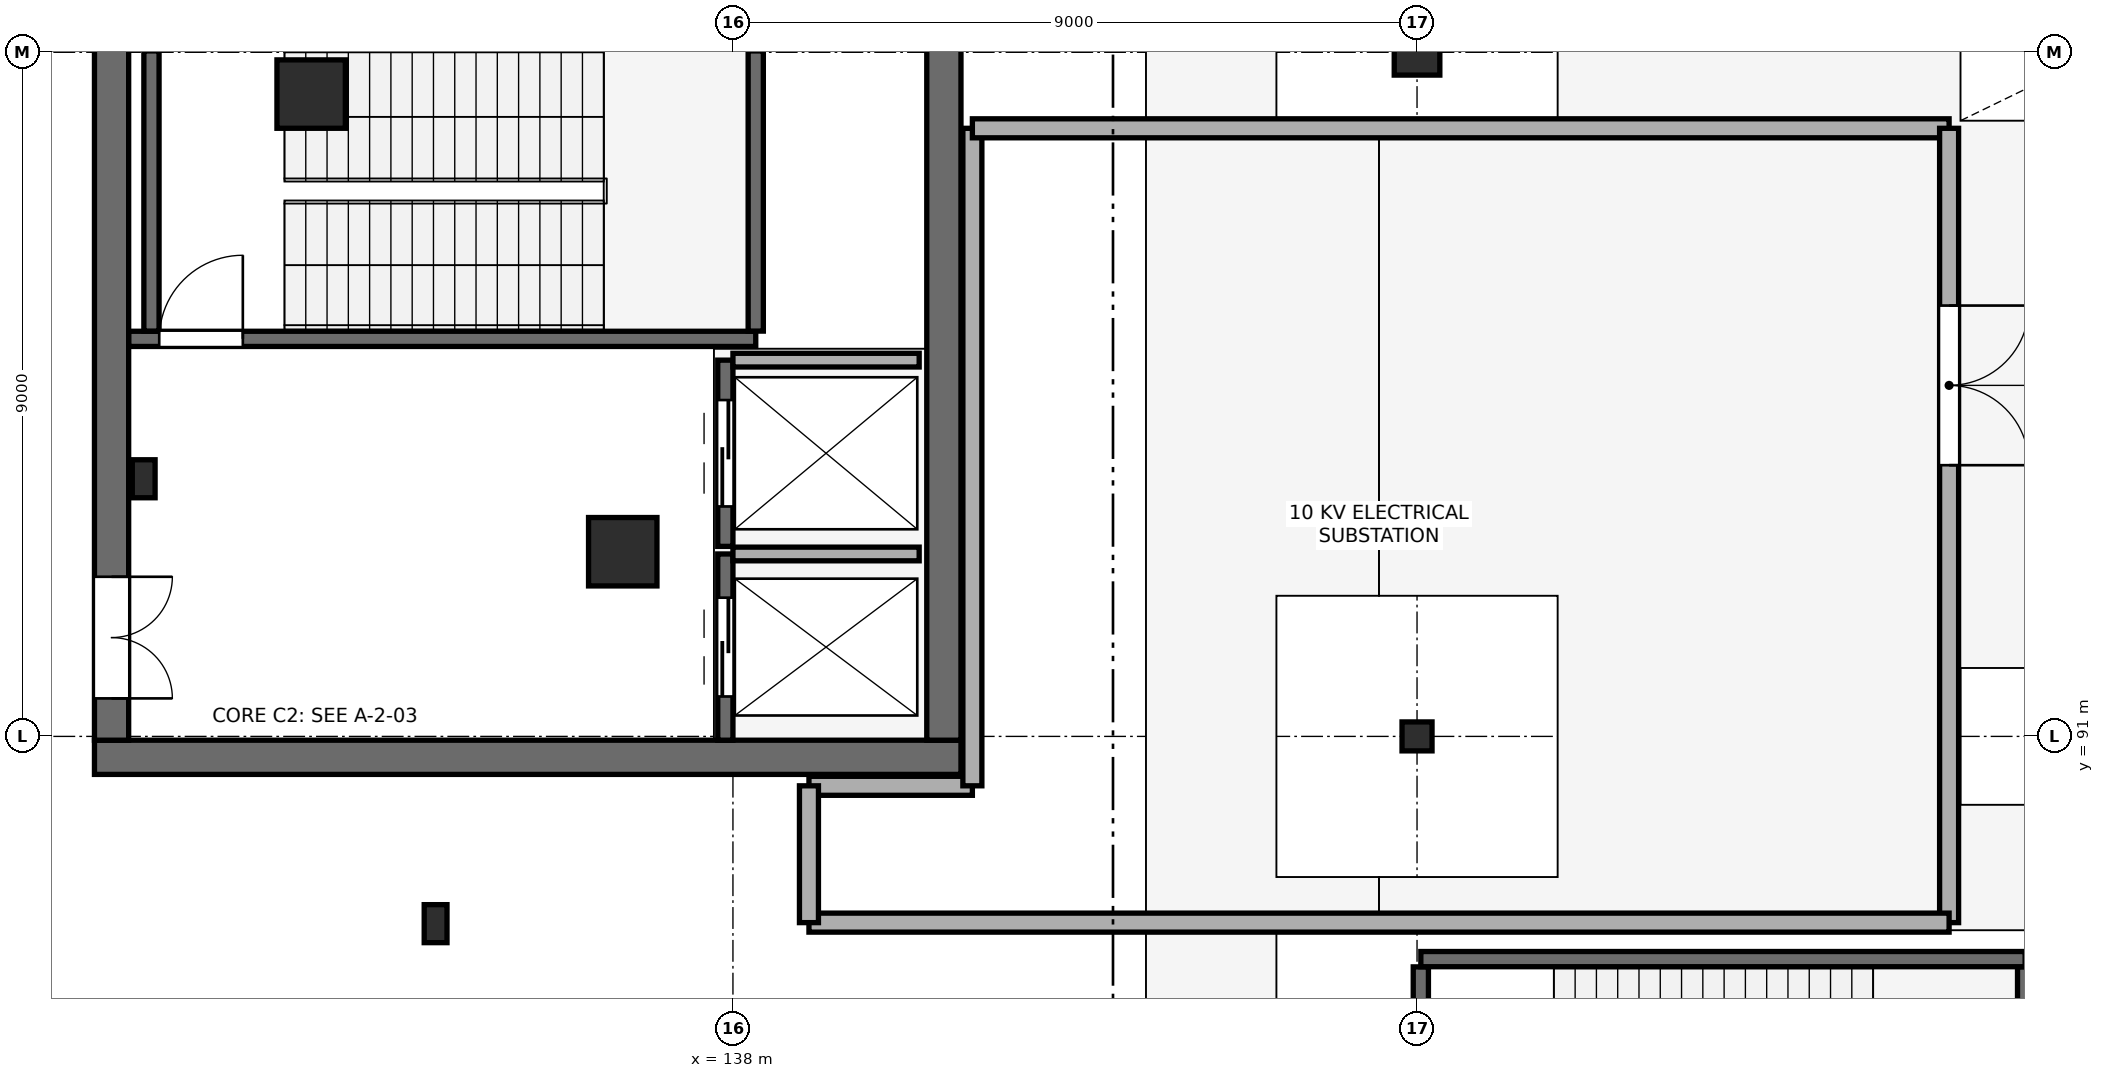
"""IFC4 building model, lengths in metres.
Left out: names, types, materials, properties, quantities, classifications, styles, units other than length and angle.
Written with IfcOpenShell. Run it as: python <this file> out.ifc"""

import sys

from ifc_helpers import new_model, si_unit, direction, frame, frame_2d, origin, origin_2d, place, context, subcontext, project, spatial, rectangle, i_section, extrude, element, fill, save


model = new_model("IFC4")
c1 = context("Model", 3, precision=1e-05, world=origin(), true_north=direction((0.0, 1.0)))
c2 = subcontext(c1, "Body", "Model", "MODEL_VIEW")
j1 = project(units=[si_unit("LENGTHUNIT", "METRE"), si_unit("PLANEANGLEUNIT", "RADIAN")], contexts=[c1])
p1 = place(None, origin())
s1 = spatial("IfcSite", under=j1, at=p1, CompositionType="ELEMENT")
p2 = place(p1, origin())
s2 = spatial("IfcBuilding", under=s1, at=p2, CompositionType="ELEMENT")
p3 = place(p2, frame((0.0, 0.0, -5.4)))
s3 = spatial("IfcBuildingStorey", under=s2, at=p3, CompositionType="ELEMENT", Elevation=-5.4)
for number, where, z_axis, x_axis in (
    (1, (136.55, 93.43, 0.0), (0.0, 0.0, 1.0), (1.0, 0.0, 0.0)),
    (2, (132.451, 99.45, 0.0), (0.0, 0.0, 1.0), (1.0, 0.0, 0.0)),
):
    element("IfcColumn", number, at=place(p3, frame(where, z_axis=z_axis, x_axis=x_axis)), inside=s3, PredefinedType="COLUMN", context=c2, shape_type="SweptSolid", body=[
        extrude(rectangle(XDim=0.9, YDim=0.9, at=origin_2d()), origin(), (0.0, 0.0, 1.0), 5.4),
    ])
p4 = place(p3, frame((134.088, 88.537, 0.0), z_axis=(0.0, 0.0, 1.0), x_axis=(1.0, 0.0, 0.0)))
e3 = element("IfcColumn", 3, at=p4, inside=s3, PredefinedType="COLUMN", context=c2, shape_type="SweptSolid", body=[
    extrude(i_section(OverallWidth=0.3, OverallDepth=0.5, WebThickness=0.014, FlangeThickness=0.028, FilletRadius=0.027, at=origin_2d()), origin(), (0.0, 0.0, 1.0), 5.4),
])
p5 = place(p3, frame((147.0, 91.0, 0.0), z_axis=(0.0, 0.0, 1.0), x_axis=(1.0, 0.0, 0.0)))
e4 = element("IfcColumn", 4, at=p5, inside=s3, PredefinedType="COLUMN", context=c2, shape_type="SweptSolid", body=[
    extrude(i_section(OverallWidth=0.395, OverallDepth=0.381, WebThickness=0.018, FlangeThickness=0.03, FilletRadius=0.015, at=origin_2d()), origin(), (0.0, 0.0, 1.0), 5.4),
])
p6 = place(p3, frame((147.0, 100.0, 0.0), z_axis=(0.0, 0.0, 1.0), x_axis=(1.0, 0.0, 0.0)))
e5 = element("IfcColumn", 5, at=p6, inside=s3, PredefinedType="COLUMN", context=c2, shape_type="SweptSolid", body=[
    extrude(rectangle(XDim=0.6, YDim=0.6, at=origin_2d()), origin(), (0.0, 0.0, 1.0), 5.4),
])
p7 = place(p3, frame((129.6, 90.725, 0.0), z_axis=(0.0, 0.0, 1.0), x_axis=(1.0, 0.0, 0.0)))
e6 = element("IfcWall", 6, at=p7, inside=s3, PredefinedType="SHEAR", context=c2, shape_type="SweptSolid", body=[
    extrude(rectangle(XDim=11.4, YDim=0.45, at=frame_2d((5.7, 0.0))), origin(), (0.0, 0.0, 1.0), 5.4),
])
p8 = place(p3, frame((129.825, 90.95, 0.0), z_axis=(0.0, 0.0, 1.0), x_axis=(0.0, 1.0, 0.0)))
e7 = element("IfcWall", 7, at=p8, inside=s3, PredefinedType="SHEAR", context=c2, shape_type="SweptSolid", body=[
    extrude(rectangle(XDim=9.1, YDim=0.45, at=frame_2d((4.55, 0.0))), origin(), (0.0, 0.0, 1.0), 5.4),
])
p9 = place(p8, frame((0.55, 0.0, 0.0)))
e8 = element("IfcOpeningElement", 8, at=p9, cuts=e7, PredefinedType="OPENING", context=c2, shape_type="SweptSolid", body=[
    extrude(rectangle(XDim=1.6, YDim=2.2, at=frame_2d((0.8, 1.1))), frame((0.0, 0.235, 0.0), z_axis=(0.0, -1.0, 0.0), x_axis=(1.0, 0.0, 0.0)), (0.0, 0.0, 1.0), 0.47),
])
p10 = place(p3, frame((140.775, 90.95, 0.0), z_axis=(0.0, 0.0, 1.0), x_axis=(0.0, 1.0, 0.0)))
e9 = element("IfcWall", 9, at=p10, inside=s3, PredefinedType="SHEAR", context=c2, shape_type="SweptSolid", body=[
    extrude(rectangle(XDim=9.1, YDim=0.45, at=frame_2d((4.55, 0.0))), origin(), (0.0, 0.0, 1.0), 5.4),
])
p11 = place(p3, frame((130.248, 94.389, 0.0), z_axis=(0.0, 0.0, 1.0), x_axis=(1.0, 0.0, 0.0)))
e10 = element("IfcColumn", 10, at=p11, inside=s3, PredefinedType="COLUMN", context=c2, shape_type="SweptSolid", body=[
    extrude(i_section(OverallWidth=0.3, OverallDepth=0.5, WebThickness=0.014, FlangeThickness=0.028, FilletRadius=0.027, at=origin_2d()), origin(), (0.0, 0.0, 1.0), 5.4),
])
p12 = place(p3, frame((137.9, 90.95, 0.0), z_axis=(0.0, 0.0, 1.0), x_axis=(0.0, 1.0, 0.0)))
e11 = element("IfcWall", 11, at=p12, inside=s3, PredefinedType="SHEAR", context=c2, shape_type="SweptSolid", body=[
    extrude(rectangle(XDim=2.45, YDim=0.2, at=frame_2d((1.225, 0.0))), origin(), (0.0, 0.0, 1.0), 5.04),
])
p13 = place(p12, frame((0.575, 0.0, 0.0)))
e12 = element("IfcOpeningElement", 12, at=p13, cuts=e11, PredefinedType="OPENING", context=c2, shape_type="SweptSolid", body=[
    extrude(rectangle(XDim=1.3, YDim=2.2, at=frame_2d((0.65, 1.1))), frame((0.0, 0.11, 0.0), z_axis=(0.0, -1.0, 0.0), x_axis=(1.0, 0.0, 0.0)), (0.0, 0.0, 1.0), 0.22),
])
p14 = place(p3, frame((138.0, 93.4, 0.0), z_axis=(0.0, 0.0, 1.0), x_axis=(1.0, 0.0, 0.0)))
e13 = element("IfcWall", 13, at=p14, inside=s3, PredefinedType="PARTITIONING", context=c2, shape_type="SweptSolid", body=[
    extrude(rectangle(XDim=2.45, YDim=0.18, at=frame_2d((1.225, 0.0))), origin(), (0.0, 0.0, 1.0), 5.4),
])
p15 = place(p3, frame((137.9, 93.5, 0.0), z_axis=(0.0, 0.0, 1.0), x_axis=(0.0, 1.0, 0.0)))
e14 = element("IfcWall", 14, at=p15, inside=s3, PredefinedType="SHEAR", context=c2, shape_type="SweptSolid", body=[
    extrude(rectangle(XDim=2.45, YDim=0.2, at=frame_2d((1.225, 0.0))), origin(), (0.0, 0.0, 1.0), 5.04),
])
p16 = place(p15, frame((0.525, 0.0, 0.0)))
e15 = element("IfcOpeningElement", 15, at=p16, cuts=e14, PredefinedType="OPENING", context=c2, shape_type="SweptSolid", body=[
    extrude(rectangle(XDim=1.4, YDim=2.2, at=frame_2d((0.7, 1.1))), frame((0.0, 0.11, 0.0), z_axis=(0.0, -1.0, 0.0), x_axis=(1.0, 0.0, 0.0)), (0.0, 0.0, 1.0), 0.22),
])
p17 = place(p3, frame((138.0, 95.95, 0.0), z_axis=(0.0, 0.0, 1.0), x_axis=(1.0, 0.0, 0.0)))
e16 = element("IfcWall", 16, at=p17, inside=s3, PredefinedType="PARTITIONING", context=c2, shape_type="SweptSolid", body=[
    extrude(rectangle(XDim=2.45, YDim=0.18, at=frame_2d((1.225, 0.0))), origin(), (0.0, 0.0, 1.0), 5.4),
])
p18 = place(p3, frame((130.052, 96.23, 0.0), z_axis=(0.0, 0.0, 1.0), x_axis=(1.0, 0.0, 0.0)))
e17 = element("IfcWall", 17, at=p18, inside=s3, PredefinedType="SHEAR", context=c2, shape_type="SweptSolid", body=[
    extrude(rectangle(XDim=8.248, YDim=0.2, at=frame_2d((4.124, 0.0))), origin(), (0.0, 0.0, 1.0), 5.4),
])
p19 = place(p18, frame((0.4, 0.0, 0.0)))
e18 = element("IfcOpeningElement", 18, at=p19, cuts=e17, PredefinedType="OPENING", context=c2, shape_type="SweptSolid", body=[
    extrude(rectangle(XDim=1.1, YDim=2.15, at=frame_2d((0.55, 1.075))), frame((0.0, 0.11, 0.0), z_axis=(0.0, -1.0, 0.0), x_axis=(1.0, 0.0, 0.0)), (0.0, 0.0, 1.0), 0.22),
])
for number, where, z_axis, x_axis in (
    (19, (130.35, 96.332, 0.0), (0.0, 0.0, 1.0), (0.0, 1.0, 0.0)),
    (20, (138.3, 96.332, 0.0), (0.0, 0.0, 1.0), (0.0, 1.0, 0.0)),
):
    element("IfcWall", number, at=place(p3, frame(where, z_axis=z_axis, x_axis=x_axis)), inside=s3, PredefinedType="SHEAR", context=c2, shape_type="SweptSolid", body=[
        extrude(rectangle(XDim=3.686, YDim=0.2, at=frame_2d((1.843, 0.0))), origin(), (0.0, 0.0, 1.0), 5.4),
    ])
p20 = place(p3, frame((147.05, 84.382, 0.0), z_axis=(0.0, 0.0, 1.0), x_axis=(0.0, 1.0, 0.0)))
e21 = element("IfcWall", 21, at=p20, inside=s3, PredefinedType="SHEAR", context=c2, shape_type="SweptSolid", body=[
    extrude(rectangle(XDim=3.586, YDim=0.2, at=frame_2d((1.793, 0.0))), origin(), (0.0, 0.0, 1.0), 5.4),
])
p21 = place(p20, frame((1.243, 0.0, 0.0)))
e22 = element("IfcOpeningElement", 22, at=p21, cuts=e21, PredefinedType="OPENING", context=c2, shape_type="SweptSolid", body=[
    extrude(rectangle(XDim=1.1, YDim=2.15, at=frame_2d((0.55, 1.075))), frame((0.0, 0.11, 0.0), z_axis=(0.0, -1.0, 0.0), x_axis=(1.0, 0.0, 0.0)), (0.0, 0.0, 1.0), 0.22),
])
p22 = place(p3, frame((155.0, 84.382, 0.0), z_axis=(0.0, 0.0, 1.0), x_axis=(0.0, 1.0, 0.0)))
e23 = element("IfcWall", 23, at=p22, inside=s3, PredefinedType="SHEAR", context=c2, shape_type="SweptSolid", body=[
    extrude(rectangle(XDim=3.586, YDim=0.2, at=frame_2d((1.793, 0.0))), origin(), (0.0, 0.0, 1.0), 5.4),
])
p23 = place(p3, frame((147.05, 88.07, 0.0), z_axis=(0.0, 0.0, 1.0), x_axis=(1.0, 0.0, 0.0)))
e24 = element("IfcWall", 24, at=p23, inside=s3, PredefinedType="SHEAR", context=c2, shape_type="SweptSolid", body=[
    extrude(rectangle(XDim=7.95, YDim=0.2, at=frame_2d((3.975, 0.0))), origin(), (0.0, 0.0, 1.0), 5.4),
])
p24 = place(p3, frame((139.0, 90.35, 0.0), z_axis=(0.0, 0.0, 1.0), x_axis=(1.0, 0.0, 0.0)))
e25 = element("IfcWall", 25, at=p24, inside=s3, PredefinedType="STANDARD", context=c2, shape_type="SweptSolid", body=[
    extrude(rectangle(XDim=2.15, YDim=0.25, at=frame_2d((1.075, 0.0))), origin(), (0.0, 0.0, 1.0), 5.04),
])
p25 = place(p3, frame((141.15, 90.35, 0.0), z_axis=(0.0, 0.0, 1.0), x_axis=(0.0, 1.0, 0.0)))
e26 = element("IfcWall", 26, at=p25, inside=s3, PredefinedType="STANDARD", context=c2, shape_type="SweptSolid", body=[
    extrude(rectangle(XDim=8.65, YDim=0.25, at=frame_2d((4.325, 0.0))), origin(), (0.0, 0.0, 1.0), 5.04),
])
p26 = place(p3, frame((141.15, 99.0, 0.0), z_axis=(0.0, 0.0, 1.0), x_axis=(1.0, 0.0, 0.0)))
e27 = element("IfcWall", 27, at=p26, inside=s3, PredefinedType="STANDARD", context=c2, shape_type="SweptSolid", body=[
    extrude(rectangle(XDim=12.85, YDim=0.25, at=frame_2d((6.425, 0.0))), origin(), (0.0, 0.0, 1.0), 5.04),
])
p27 = place(p3, frame((154.0, 99.0, 0.0), z_axis=(0.0, 0.0, 1.0), x_axis=(0.0, -1.0, 0.0)))
e28 = element("IfcWall", 28, at=p27, inside=s3, PredefinedType="STANDARD", context=c2, shape_type="SweptSolid", body=[
    extrude(rectangle(XDim=10.45, YDim=0.25, at=frame_2d((5.225, 0.0))), origin(), (0.0, 0.0, 1.0), 5.04),
])
p28 = place(p27, frame((2.332, 0.0, 0.0)))
e29 = element("IfcOpeningElement", 29, at=p28, cuts=e28, PredefinedType="OPENING", context=c2, shape_type="SweptSolid", body=[
    extrude(rectangle(XDim=2.1, YDim=2.4, at=frame_2d((1.05, 1.2))), frame((0.0, 0.135, 0.0), z_axis=(0.0, -1.0, 0.0), x_axis=(1.0, 0.0, 0.0)), (0.0, 0.0, 1.0), 0.27),
])
p29 = place(p3, frame((154.0, 88.55, 0.0), z_axis=(0.0, 0.0, 1.0), x_axis=(-1.0, 0.0, 0.0)))
e30 = element("IfcWall", 30, at=p29, inside=s3, PredefinedType="STANDARD", context=c2, shape_type="SweptSolid", body=[
    extrude(rectangle(XDim=15.0, YDim=0.25, at=frame_2d((7.5, 0.0))), origin(), (0.0, 0.0, 1.0), 5.04),
])
p30 = place(p3, frame((139.0, 88.55, 0.0), z_axis=(0.0, 0.0, 1.0), x_axis=(0.0, 1.0, 0.0)))
e31 = element("IfcWall", 31, at=p30, inside=s3, PredefinedType="STANDARD", context=c2, shape_type="SweptSolid", body=[
    extrude(rectangle(XDim=1.8, YDim=0.25, at=frame_2d((0.9, 0.0))), origin(), (0.0, 0.0, 1.0), 5.04),
])
p31 = place(p13, origin())
e32 = element("IfcDoor", 32, at=p31, inside=s3, OperationType="DOUBLE_DOOR_SLIDING", PredefinedType="DOOR", context=c2, shape_type="SweptSolid", body=[
    extrude(rectangle(XDim=1.3, YDim=2.2, at=frame_2d((0.65, 1.1))), frame((0.0, 0.025, 0.0), z_axis=(0.0, -1.0, 0.0), x_axis=(1.0, 0.0, 0.0)), (0.0, 0.0, 1.0), 0.05),
])
fill(e12, e32)
p32 = place(p16, origin())
e33 = element("IfcDoor", 33, at=p32, inside=s3, OperationType="DOUBLE_DOOR_SLIDING", PredefinedType="DOOR", context=c2, shape_type="SweptSolid", body=[
    extrude(rectangle(XDim=1.4, YDim=2.2, at=frame_2d((0.7, 1.1))), frame((0.0, 0.025, 0.0), z_axis=(0.0, -1.0, 0.0), x_axis=(1.0, 0.0, 0.0)), (0.0, 0.0, 1.0), 0.05),
])
fill(e15, e33)
p33 = place(p19, frame((1.1, 0.0, 0.0), z_axis=(0.0, 0.0, 1.0), x_axis=(-1.0, 0.0, 0.0)))
e34 = element("IfcDoor", 34, at=p33, inside=s3, OperationType="SINGLE_SWING_LEFT", PredefinedType="DOOR", context=c2, shape_type="SweptSolid", body=[
    extrude(rectangle(XDim=1.1, YDim=2.15, at=frame_2d((0.55, 1.075))), frame((0.0, 0.025, 0.0), z_axis=(0.0, -1.0, 0.0), x_axis=(1.0, 0.0, 0.0)), (0.0, 0.0, 1.0), 0.05),
])
fill(e18, e34)
p34 = place(p9, frame((1.6, 0.0, 0.0), z_axis=(0.0, 0.0, 1.0), x_axis=(-1.0, 0.0, 0.0)))
e35 = element("IfcDoor", 35, at=p34, inside=s3, OperationType="DOUBLE_DOOR_SINGLE_SWING", PredefinedType="DOOR", context=c2, shape_type="SweptSolid", body=[
    extrude(rectangle(XDim=1.6, YDim=2.2, at=frame_2d((0.8, 1.1))), frame((0.0, 0.025, 0.0), z_axis=(0.0, -1.0, 0.0), x_axis=(1.0, 0.0, 0.0)), (0.0, 0.0, 1.0), 0.05),
])
fill(e8, e35)
p35 = place(p28, origin())
e36 = element("IfcDoor", 36, at=p35, inside=s3, OperationType="DOUBLE_DOOR_SINGLE_SWING", PredefinedType="DOOR", context=c2, shape_type="SweptSolid", body=[
    extrude(rectangle(XDim=2.1, YDim=2.4, at=frame_2d((1.05, 1.2))), frame((0.0, 0.025, 0.0), z_axis=(0.0, -1.0, 0.0), x_axis=(1.0, 0.0, 0.0)), (0.0, 0.0, 1.0), 0.05),
])
fill(e29, e36)
save(model, sys.argv[1])
